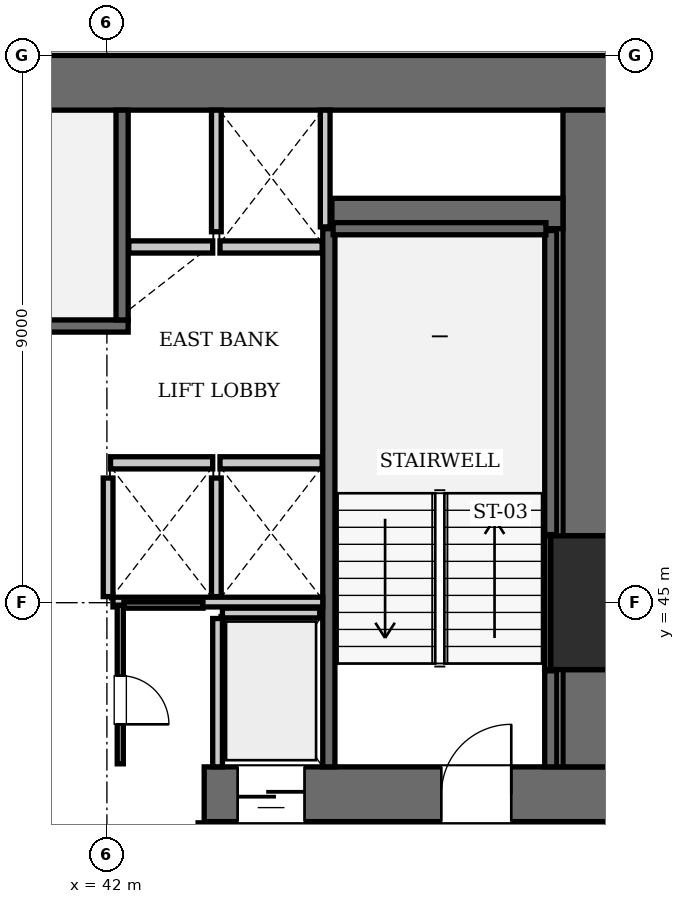
"""IFC4 building model, lengths in metres.
Left out: names, types, materials, properties, quantities, classifications, styles, units other than length and angle.
Written with IfcOpenShell. Run it as: python <this file> out.ifc"""

import sys

from ifc_helpers import new_model, si_unit, direction, frame, frame_2d, origin, origin_2d, place, context, subcontext, project, spatial, rectangle, extrude, element, fill, save


model = new_model("IFC4")
c1 = context("Model", 3, precision=1e-05, world=origin(), true_north=direction((0.0, 1.0)))
c2 = subcontext(c1, "Body", "Model", "MODEL_VIEW")
j1 = project(units=[si_unit("LENGTHUNIT", "METRE"), si_unit("PLANEANGLEUNIT", "RADIAN")], contexts=[c1])
p1 = place(None, origin())
s1 = spatial("IfcSite", under=j1, at=p1, CompositionType="ELEMENT")
p2 = place(p1, origin())
s2 = spatial("IfcBuilding", under=s1, at=p2, CompositionType="ELEMENT")
p3 = place(p2, frame((0.0, 0.0, 38.5)))
s3 = spatial("IfcBuildingStorey", under=s2, at=p3, CompositionType="ELEMENT", Elevation=38.5)
p4 = place(p3, frame((50.4, 45.0, 0.0), z_axis=(0.0, 0.0, 1.0), x_axis=(1.0, 0.0, 0.0)))
e1 = element("IfcColumn", 1, at=p4, inside=s3, PredefinedType="COLUMN", context=c2, shape_type="SweptSolid", body=[
    extrude(rectangle(XDim=2.2, YDim=2.2, at=origin_2d()), origin(), (0.0, 0.0, 1.0), 3.85),
])
p5 = place(p3, frame((25.2, 53.55, 0.0), z_axis=(0.0, 0.0, 1.0), x_axis=(1.0, 0.0, 0.0)))
e2 = element("IfcWall", 2, at=p5, inside=s3, PredefinedType="SHEAR", context=c2, shape_type="SweptSolid", body=[
    extrude(rectangle(XDim=25.2, YDim=0.9, at=frame_2d((12.6, 0.0))), origin(), (0.0, 0.0, 1.0), 3.85),
])
p6 = place(p3, frame((43.6, 41.85, 0.0), z_axis=(0.0, 0.0, 1.0), x_axis=(1.0, 0.0, 0.0)))
e3 = element("IfcWall", 3, at=p6, inside=s3, PredefinedType="SHEAR", context=c2, shape_type="SweptSolid", body=[
    extrude(rectangle(XDim=6.8, YDim=0.9, at=frame_2d((3.4, 0.0))), origin(), (0.0, 0.0, 1.0), 3.85),
])
p7 = place(p6, frame((3.9, 0.0, 0.0)))
e4 = element("IfcOpeningElement", 4, at=p7, cuts=e3, PredefinedType="OPENING", context=c2, shape_type="SweptSolid", body=[
    extrude(rectangle(XDim=1.15, YDim=2.15, at=frame_2d((0.575, 1.075))), frame((0.0, 0.46, 0.0), z_axis=(0.0, -1.0, 0.0), x_axis=(1.0, 0.0, 0.0)), (0.0, 0.0, 1.0), 0.92),
])
p8 = place(p6, frame((0.55, 0.0, 0.0)))
e5 = element("IfcOpeningElement", 5, at=p8, cuts=e3, PredefinedType="OPENING", context=c2, shape_type="SweptSolid", body=[
    extrude(rectangle(XDim=1.1, YDim=2.2, at=frame_2d((0.55, 1.1))), frame((0.0, 0.46, 0.0), z_axis=(0.0, -1.0, 0.0), x_axis=(1.0, 0.0, 0.0)), (0.0, 0.0, 1.0), 0.92),
])
p9 = place(p3, frame((49.95, 42.3, 0.0), z_axis=(0.0, 0.0, 1.0), x_axis=(0.0, 1.0, 0.0)))
e6 = element("IfcWall", 6, at=p9, inside=s3, PredefinedType="SHEAR", context=c2, shape_type="SweptSolid", body=[
    extrude(rectangle(XDim=1.6, YDim=0.9, at=frame_2d((0.8, 0.0))), origin(), (0.0, 0.0, 1.0), 3.85),
])
p10 = place(p3, frame((49.95, 46.1, 0.0), z_axis=(0.0, 0.0, 1.0), x_axis=(0.0, 1.0, 0.0)))
e7 = element("IfcWall", 7, at=p10, inside=s3, PredefinedType="SHEAR", context=c2, shape_type="SweptSolid", body=[
    extrude(rectangle(XDim=7.0, YDim=0.9, at=frame_2d((3.5, 0.0))), origin(), (0.0, 0.0, 1.0), 3.85),
])
p11 = place(p3, frame((45.7, 51.4, 0.0), z_axis=(0.0, 0.0, 1.0), x_axis=(1.0, 0.0, 0.0)))
e8 = element("IfcWall", 8, at=p11, inside=s3, PredefinedType="SHEAR", context=c2, shape_type="SweptSolid", body=[
    extrude(rectangle(XDim=3.8, YDim=0.5, at=frame_2d((1.9, 0.0))), origin(), (0.0, 0.0, 1.0), 3.85),
])
p12 = place(p3, frame((33.25, 49.55, 0.0), z_axis=(0.0, 0.0, 1.0), x_axis=(1.0, 0.0, 0.0)))
e9 = element("IfcWall", 9, at=p12, inside=s3, PredefinedType="SOLIDWALL", context=c2, shape_type="SweptSolid", body=[
    extrude(rectangle(XDim=9.1, YDim=0.2, at=frame_2d((4.55, 0.0))), origin(), (0.0, 0.0, 1.0), 3.61),
])
p13 = place(p3, frame((42.25, 49.65, 0.0), z_axis=(0.0, 0.0, 1.0), x_axis=(0.0, 1.0, 0.0)))
e10 = element("IfcWall", 10, at=p13, inside=s3, PredefinedType="SOLIDWALL", context=c2, shape_type="SweptSolid", body=[
    extrude(rectangle(XDim=3.45, YDim=0.2, at=frame_2d((1.725, 0.0))), origin(), (0.0, 0.0, 1.0), 3.61),
])
p14 = place(p3, frame((45.65, 42.3, 0.0), z_axis=(0.0, 0.0, 1.0), x_axis=(0.0, 1.0, 0.0)))
e11 = element("IfcWall", 11, at=p14, inside=s3, PredefinedType="SOLIDWALL", context=c2, shape_type="SweptSolid", body=[
    extrude(rectangle(XDim=8.85, YDim=0.2, at=frame_2d((4.425, 0.0))), origin(), (0.0, 0.0, 1.0), 3.61),
])
p15 = place(p3, frame((49.3, 42.3, 0.0), z_axis=(0.0, 0.0, 1.0), x_axis=(0.0, 1.0, 0.0)))
e12 = element("IfcWall", 12, at=p15, inside=s3, PredefinedType="SOLIDWALL", context=c2, shape_type="SweptSolid", body=[
    extrude(rectangle(XDim=1.58, YDim=0.2, at=frame_2d((0.79, 0.0))), origin(), (0.0, 0.0, 1.0), 3.61),
])
p16 = place(p3, frame((49.3, 46.12, 0.0), z_axis=(0.0, 0.0, 1.0), x_axis=(0.0, 1.0, 0.0)))
e13 = element("IfcWall", 13, at=p16, inside=s3, PredefinedType="SOLIDWALL", context=c2, shape_type="SweptSolid", body=[
    extrude(rectangle(XDim=5.0, YDim=0.2, at=frame_2d((2.5, 0.0))), origin(), (0.0, 0.0, 1.0), 3.61),
])
p17 = place(p3, frame((45.72, 51.15, 0.0), z_axis=(0.0, 0.0, 1.0), x_axis=(1.0, 0.0, 0.0)))
e14 = element("IfcWall", 14, at=p17, inside=s3, PredefinedType="SOLIDWALL", context=c2, shape_type="SweptSolid", body=[
    extrude(rectangle(XDim=3.5, YDim=0.2, at=frame_2d((1.75, 0.0))), origin(), (0.0, 0.0, 1.0), 3.61),
])
p18 = place(p3, frame((49.248, 43.9, 0.0), z_axis=(0.0, 0.0, 1.0), x_axis=(0.0, 1.0, 0.0)))
e15 = element("IfcWall", 15, at=p18, inside=s3, PredefinedType="SOLIDWALL", context=c2, shape_type="SweptSolid", body=[
    extrude(rectangle(XDim=2.2, YDim=0.1, at=frame_2d((1.1, 0.0))), origin(), (0.0, 0.0, 1.0), 3.61),
])
for number, where, z_axis, x_axis in (
    (16, (42.06, 47.3, 0.0), (0.0, 0.0, 1.0), (1.0, 0.0, 0.0)),
    (17, (43.86, 47.3, 0.0), (0.0, 0.0, 1.0), (1.0, 0.0, 0.0)),
):
    element("IfcWall", number, at=place(p3, frame(where, z_axis=z_axis, x_axis=x_axis)), inside=s3, PredefinedType="SOLIDWALL", context=c2, shape_type="SweptSolid", body=[
        extrude(rectangle(XDim=1.68, YDim=0.2, at=frame_2d((0.84, 0.0))), origin(), (0.0, 0.0, 1.0), 3.61),
    ])
p19 = place(p3, frame((42.36, 50.85, 0.0), z_axis=(0.0, 0.0, 1.0), x_axis=(1.0, 0.0, 0.0)))
e18 = element("IfcWall", 18, at=p19, inside=s3, PredefinedType="SOLIDWALL", context=c2, shape_type="SweptSolid", body=[
    extrude(rectangle(XDim=1.38, YDim=0.2, at=frame_2d((0.69, 0.0))), origin(), (0.0, 0.0, 1.0), 3.61),
])
p20 = place(p3, frame((43.86, 50.85, 0.0), z_axis=(0.0, 0.0, 1.0), x_axis=(1.0, 0.0, 0.0)))
e19 = element("IfcWall", 19, at=p20, inside=s3, PredefinedType="SOLIDWALL", context=c2, shape_type="SweptSolid", body=[
    extrude(rectangle(XDim=1.68, YDim=0.2, at=frame_2d((0.84, 0.0))), origin(), (0.0, 0.0, 1.0), 3.61),
])
p21 = place(p3, frame((43.9, 44.83, 0.0), z_axis=(0.0, 0.0, 1.0), x_axis=(1.0, 0.0, 0.0)))
e20 = element("IfcWall", 20, at=p21, inside=s3, PredefinedType="SOLIDWALL", context=c2, shape_type="SweptSolid", body=[
    extrude(rectangle(XDim=1.6, YDim=0.16, at=frame_2d((0.8, 0.0))), origin(), (0.0, 0.0, 1.0), 3.61),
])
p22 = place(p3, frame((43.82, 42.3, 0.0), z_axis=(0.0, 0.0, 1.0), x_axis=(0.0, 1.0, 0.0)))
e21 = element("IfcWall", 21, at=p22, inside=s3, PredefinedType="SOLIDWALL", context=c2, shape_type="SweptSolid", body=[
    extrude(rectangle(XDim=2.44, YDim=0.16, at=frame_2d((1.22, 0.0))), origin(), (0.0, 0.0, 1.0), 3.61),
])
for number, where, z_axis, x_axis in (
    (22, (42.02, 45.1, 0.0), (0.0, 0.0, 1.0), (0.0, 1.0, 0.0)),
    (23, (43.8, 45.1, 0.0), (0.0, 0.0, 1.0), (0.0, 1.0, 0.0)),
):
    element("IfcWall", number, at=place(p3, frame(where, z_axis=z_axis, x_axis=x_axis)), inside=s3, PredefinedType="SOLIDWALL", context=c2, shape_type="SweptSolid", body=[
        extrude(rectangle(XDim=1.95, YDim=0.16, at=frame_2d((0.975, 0.0))), origin(), (0.0, 0.0, 1.0), 3.61),
    ])
p23 = place(p3, frame((42.1, 45.01, 0.0), z_axis=(0.0, 0.0, 1.0), x_axis=(1.0, 0.0, 0.0)))
e24 = element("IfcWall", 24, at=p23, inside=s3, PredefinedType="SOLIDWALL", context=c2, shape_type="SweptSolid", body=[
    extrude(rectangle(XDim=3.45, YDim=0.16, at=frame_2d((1.725, 0.0))), origin(), (0.0, 0.0, 1.0), 3.61),
])
p24 = place(p3, frame((45.59, 51.18, 0.0), z_axis=(0.0, 0.0, 1.0), x_axis=(0.0, 1.0, 0.0)))
e25 = element("IfcWall", 25, at=p24, inside=s3, PredefinedType="SOLIDWALL", context=c2, shape_type="SweptSolid", body=[
    extrude(rectangle(XDim=1.92, YDim=0.16, at=frame_2d((0.96, 0.0))), origin(), (0.0, 0.0, 1.0), 3.61),
])
p25 = place(p3, frame((43.8, 51.1, 0.0), z_axis=(0.0, 0.0, 1.0), x_axis=(0.0, 1.0, 0.0)))
e26 = element("IfcWall", 26, at=p25, inside=s3, PredefinedType="SOLIDWALL", context=c2, shape_type="SweptSolid", body=[
    extrude(rectangle(XDim=2.0, YDim=0.16, at=frame_2d((1.0, 0.0))), origin(), (0.0, 0.0, 1.0), 3.61),
])
for number, where, z_axis, x_axis in (
    (27, (43.6, 38.31, 0.0), (0.0, 0.0, 1.0), (0.0, 1.0, 0.0)),
    (28, (49.4, 38.31, 0.0), (0.0, 0.0, 1.0), (0.0, 1.0, 0.0)),
):
    element("IfcWall", number, at=place(p3, frame(where, z_axis=z_axis, x_axis=x_axis)), inside=s3, PredefinedType="PARTITIONING", context=c2, shape_type="SweptSolid", body=[
        extrude(rectangle(XDim=3.07, YDim=0.2, at=frame_2d((1.535, 0.0))), origin(), (0.0, 0.0, 1.0), 3.61),
    ])
p26 = place(p3, frame((42.22, 42.35, 0.0), z_axis=(0.0, 0.0, 1.0), x_axis=(0.0, 1.0, 0.0)))
e29 = element("IfcWall", 29, at=p26, inside=s3, PredefinedType="PARTITIONING", context=c2, shape_type="SweptSolid", body=[
    extrude(rectangle(XDim=2.61, YDim=0.1, at=frame_2d((1.305, 0.0))), origin(), (0.0, 0.0, 1.0), 3.61),
])
p27 = place(p26, frame((0.65, 0.0, 0.0)))
e30 = element("IfcOpeningElement", 30, at=p27, cuts=e29, PredefinedType="OPENING", context=c2, shape_type="SweptSolid", body=[
    extrude(rectangle(XDim=0.8, YDim=2.05, at=frame_2d((0.4, 1.025))), frame((0.0, 0.06, 0.0), z_axis=(0.0, -1.0, 0.0), x_axis=(1.0, 0.0, 0.0)), (0.0, 0.0, 1.0), 0.12),
])
p28 = place(p3, frame((42.28, 44.96, 0.0), z_axis=(0.0, 0.0, 1.0), x_axis=(1.0, 0.0, 0.0)))
e31 = element("IfcWall", 31, at=p28, inside=s3, PredefinedType="PARTITIONING", context=c2, shape_type="SweptSolid", body=[
    extrude(rectangle(XDim=1.3, YDim=0.1, at=frame_2d((0.65, 0.0))), origin(), (0.0, 0.0, 1.0), 3.61),
])
p29 = place(p7, origin())
e32 = element("IfcDoor", 32, at=p29, inside=s3, OperationType="SINGLE_SWING_RIGHT", PredefinedType="DOOR", context=c2, shape_type="SweptSolid", body=[
    extrude(rectangle(XDim=1.15, YDim=2.15, at=frame_2d((0.575, 1.075))), frame((0.0, 0.025, 0.0), z_axis=(0.0, -1.0, 0.0), x_axis=(1.0, 0.0, 0.0)), (0.0, 0.0, 1.0), 0.05),
])
fill(e4, e32)
p30 = place(p8, frame((1.1, 0.0, 0.0), z_axis=(0.0, 0.0, 1.0), x_axis=(-1.0, 0.0, 0.0)))
e33 = element("IfcDoor", 33, at=p30, inside=s3, OperationType="SLIDING_TO_LEFT", PredefinedType="DOOR", context=c2, shape_type="SweptSolid", body=[
    extrude(rectangle(XDim=1.1, YDim=2.2, at=frame_2d((0.55, 1.1))), frame((0.0, 0.025, 0.0), z_axis=(0.0, -1.0, 0.0), x_axis=(1.0, 0.0, 0.0)), (0.0, 0.0, 1.0), 0.05),
])
fill(e5, e33)
p31 = place(p27, frame((0.8, 0.0, 0.0), z_axis=(0.0, 0.0, 1.0), x_axis=(-1.0, 0.0, 0.0)))
e34 = element("IfcDoor", 34, at=p31, inside=s3, OperationType="SINGLE_SWING_RIGHT", PredefinedType="DOOR", context=c2, shape_type="SweptSolid", body=[
    extrude(rectangle(XDim=0.8, YDim=2.05, at=frame_2d((0.4, 1.025))), frame((0.0, 0.025, 0.0), z_axis=(0.0, -1.0, 0.0), x_axis=(1.0, 0.0, 0.0)), (0.0, 0.0, 1.0), 0.05),
])
fill(e30, e34)
save(model, sys.argv[1])
